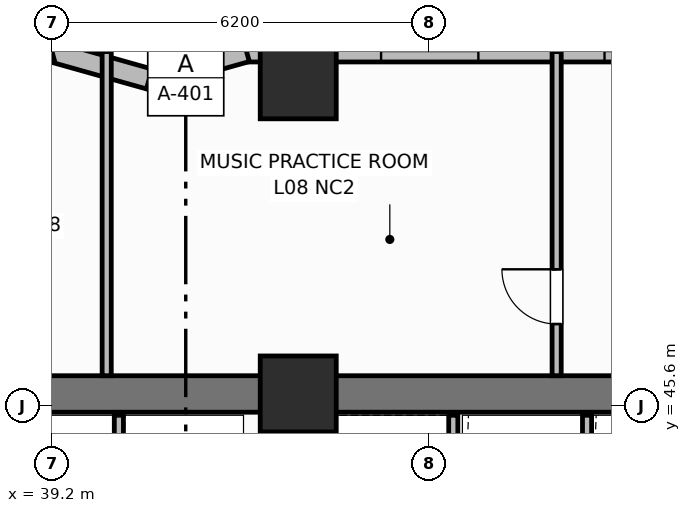
"""IFC4 building model, lengths in metres.
Left out: names, types, materials, properties, quantities, classifications, styles, units other than length and angle.
Written with IfcOpenShell. Run it as: python <this file> out.ifc"""

import sys

from ifc_helpers import new_model, si_unit, direction, frame, frame_2d, origin, origin_2d, place, context, subcontext, project, spatial, rectangle, extrude, element, fill, save


model = new_model("IFC4")
c1 = context("Model", 3, precision=1e-05, world=origin(), true_north=direction((0.0, 1.0)))
c2 = subcontext(c1, "Body", "Model", "MODEL_VIEW")
j1 = project(units=[si_unit("LENGTHUNIT", "METRE"), si_unit("PLANEANGLEUNIT", "RADIAN")], contexts=[c1])
p1 = place(None, origin())
s1 = spatial("IfcSite", under=j1, at=p1, CompositionType="ELEMENT")
p2 = place(p1, origin())
s2 = spatial("IfcBuilding", under=s1, at=p2, CompositionType="ELEMENT")
p3 = place(p2, frame((0.0, 0.0, 36.2)))
s3 = spatial("IfcBuildingStorey", under=s2, at=p3, CompositionType="ELEMENT", Elevation=36.2)
p4 = place(p3, frame((25.6, 45.8, 0.0), z_axis=(0.0, 0.0, 1.0), x_axis=(1.0, 0.0, 0.0)))
e1 = element("IfcWall", 1, at=p4, inside=s3, PredefinedType="SHEAR", context=c2, shape_type="SweptSolid", body=[
    extrude(rectangle(XDim=27.2, YDim=0.6, at=frame_2d((13.6, 0.0))), origin(), (0.0, 0.0, 1.0), 3.7),
])
p5 = place(p3, frame((43.25, 39.9, 0.0), z_axis=(0.0, 0.0, 1.0), x_axis=(0.0, 1.0, 0.0)))
e2 = element("IfcWall", 2, at=p5, inside=s3, PredefinedType="SHEAR", context=c2, shape_type="SweptSolid", body=[
    extrude(rectangle(XDim=5.6, YDim=0.4, at=frame_2d((2.8, 0.0))), origin(), (0.0, 0.0, 1.0), 3.7),
])
for number, where, z_axis, x_axis in (
    (3, (43.25, 45.8, 0.0), (0.0, 0.0, 1.0), (1.0, 0.0, 0.0)),
    (4, (43.25, 50.95, 0.0), (0.0, 0.0, 1.0), (1.0, 0.0, 0.0)),
):
    element("IfcColumn", number, at=place(p3, frame(where, z_axis=z_axis, x_axis=x_axis)), inside=s3, PredefinedType="COLUMN", context=c2, shape_type="SweptSolid", body=[
        extrude(rectangle(XDim=1.25, YDim=1.25, at=origin_2d()), origin(), (0.0, 0.0, 1.0), 3.7),
    ])
p6 = place(p3, frame((59.8, 51.43, 0.0), z_axis=(0.0, 0.0, 1.0), x_axis=(-1.0, 0.0, 0.0)))
e5 = element("IfcWall", 5, at=p6, inside=s3, PredefinedType="SOLIDWALL", context=c2, shape_type="SweptSolid", body=[
    extrude(rectangle(XDim=17.4, YDim=0.34, at=frame_2d((8.7, 0.0))), origin(), (0.0, 0.0, 1.0), 2.7),
])
p7 = place(p6, frame((1.863, 0.0, 0.68)))
e6 = element("IfcOpeningElement", 6, at=p7, cuts=e5, PredefinedType="OPENING", context=c2, shape_type="SweptSolid", body=[
    extrude(rectangle(XDim=1.6, YDim=1.9, at=frame_2d((0.8, 0.95))), frame((0.0, 0.18, 0.0), z_axis=(0.0, -1.0, 0.0), x_axis=(1.0, 0.0, 0.0)), (0.0, 0.0, 1.0), 0.36),
])
p8 = place(p6, frame((9.913, 0.0, 0.68)))
e7 = element("IfcOpeningElement", 7, at=p8, cuts=e5, PredefinedType="OPENING", context=c2, shape_type="SweptSolid", body=[
    extrude(rectangle(XDim=1.6, YDim=1.9, at=frame_2d((0.8, 0.95))), frame((0.0, 0.18, 0.0), z_axis=(0.0, -1.0, 0.0), x_axis=(1.0, 0.0, 0.0)), (0.0, 0.0, 1.0), 0.36),
])
p9 = place(p6, frame((13.587, 0.0, 0.68)))
e8 = element("IfcOpeningElement", 8, at=p9, cuts=e5, PredefinedType="OPENING", context=c2, shape_type="SweptSolid", body=[
    extrude(rectangle(XDim=1.6, YDim=1.9, at=frame_2d((0.8, 0.95))), frame((0.0, 0.18, 0.0), z_axis=(0.0, -1.0, 0.0), x_axis=(1.0, 0.0, 0.0)), (0.0, 0.0, 1.0), 0.36),
])
p10 = place(p3, frame((42.4, 51.43, 0.0), z_axis=(0.0, 0.0, 1.0), x_axis=(-0.962652136636, -0.270741322725, 0.0)))
e9 = element("IfcWall", 9, at=p10, inside=s3, PredefinedType="SOLIDWALL", context=c2, shape_type="SweptSolid", body=[
    extrude(rectangle(XDim=1.662, YDim=0.34, at=frame_2d((0.831, 0.0))), origin(), (0.0, 0.0, 1.0), 2.7),
])
p11 = place(p3, frame((40.8, 50.98, 0.0), z_axis=(0.0, 0.0, 1.0), x_axis=(-0.962662902433, 0.270703040766, 0.0)))
e10 = element("IfcWall", 10, at=p11, inside=s3, PredefinedType="SOLIDWALL", context=c2, shape_type="SweptSolid", body=[
    extrude(rectangle(XDim=1.662, YDim=0.34, at=frame_2d((0.831, 0.0))), origin(), (0.0, 0.0, 1.0), 2.7),
])
p12 = place(p3, frame((39.2, 51.43, 0.0), z_axis=(0.0, 0.0, 1.0), x_axis=(-0.962652136636, -0.270741322725, 0.0)))
e11 = element("IfcWall", 11, at=p12, inside=s3, PredefinedType="SOLIDWALL", context=c2, shape_type="SweptSolid", body=[
    extrude(rectangle(XDim=1.662, YDim=0.34, at=frame_2d((0.831, 0.0))), origin(), (0.0, 0.0, 1.0), 2.7),
])
for number, where, z_axis, x_axis in (
    (12, (40.3, 42.65, 0.0), (0.0, 0.0, 1.0), (0.0, 1.0, 0.0)),
    (13, (45.8, 42.65, 0.0), (0.0, 0.0, 1.0), (0.0, 1.0, 0.0)),
    (14, (48.0, 42.65, 0.0), (0.0, 0.0, 1.0), (0.0, 1.0, 0.0)),
):
    element("IfcWall", number, at=place(p3, frame(where, z_axis=z_axis, x_axis=x_axis)), inside=s3, PredefinedType="PARTITIONING", context=c2, shape_type="SweptSolid", body=[
        extrude(rectangle(XDim=2.8, YDim=0.15, at=frame_2d((1.4, 0.0))), origin(), (0.0, 0.0, 1.0), 2.53),
    ])
p13 = place(p3, frame((40.1, 46.1, 0.0), z_axis=(0.0, 0.0, 1.0), x_axis=(0.0, 1.0, 0.0)))
e15 = element("IfcWall", 15, at=p13, inside=s3, PredefinedType="PARTITIONING", context=c2, shape_type="SweptSolid", body=[
    extrude(rectangle(XDim=5.33, YDim=0.15, at=frame_2d((2.665, 0.0))), origin(), (0.0, 0.0, 1.0), 2.53),
])
p14 = place(p3, frame((47.5, 46.1, 0.0), z_axis=(0.0, 0.0, 1.0), x_axis=(0.0, 1.0, 0.0)))
e16 = element("IfcWall", 16, at=p14, inside=s3, PredefinedType="PARTITIONING", context=c2, shape_type="SweptSolid", body=[
    extrude(rectangle(XDim=5.33, YDim=0.15, at=frame_2d((2.665, 0.0))), origin(), (0.0, 0.0, 1.0), 2.53),
])
p15 = place(p14, frame((0.85, 0.0, 0.0)))
e17 = element("IfcOpeningElement", 17, at=p15, cuts=e16, PredefinedType="OPENING", context=c2, shape_type="SweptSolid", body=[
    extrude(rectangle(XDim=0.9, YDim=2.1, at=frame_2d((0.45, 1.05))), frame((0.0, 0.085, 0.0), z_axis=(0.0, -1.0, 0.0), x_axis=(1.0, 0.0, 0.0)), (0.0, 0.0, 1.0), 0.17),
])
p16 = place(p8, origin())
e18 = element("IfcWindow", 18, at=p16, inside=s3, PartitioningType="SINGLE_PANEL", PredefinedType="WINDOW", context=c2, shape_type="SweptSolid", body=[
    extrude(rectangle(XDim=1.6, YDim=1.9, at=frame_2d((0.8, 0.95))), frame((0.0, 0.03, 0.0), z_axis=(0.0, -1.0, 0.0), x_axis=(1.0, 0.0, 0.0)), (0.0, 0.0, 1.0), 0.06),
])
fill(e7, e18)
p17 = place(p9, origin())
e19 = element("IfcWindow", 19, at=p17, inside=s3, PartitioningType="SINGLE_PANEL", PredefinedType="WINDOW", context=c2, shape_type="SweptSolid", body=[
    extrude(rectangle(XDim=1.6, YDim=1.9, at=frame_2d((0.8, 0.95))), frame((0.0, 0.03, 0.0), z_axis=(0.0, -1.0, 0.0), x_axis=(1.0, 0.0, 0.0)), (0.0, 0.0, 1.0), 0.06),
])
fill(e8, e19)
p18 = place(p15, origin())
e20 = element("IfcDoor", 20, at=p18, inside=s3, OperationType="SINGLE_SWING_RIGHT", PredefinedType="DOOR", context=c2, shape_type="SweptSolid", body=[
    extrude(rectangle(XDim=0.9, YDim=2.1, at=frame_2d((0.45, 1.05))), frame((0.0, 0.025, 0.0), z_axis=(0.0, -1.0, 0.0), x_axis=(1.0, 0.0, 0.0)), (0.0, 0.0, 1.0), 0.05),
])
fill(e17, e20)
save(model, sys.argv[1])
